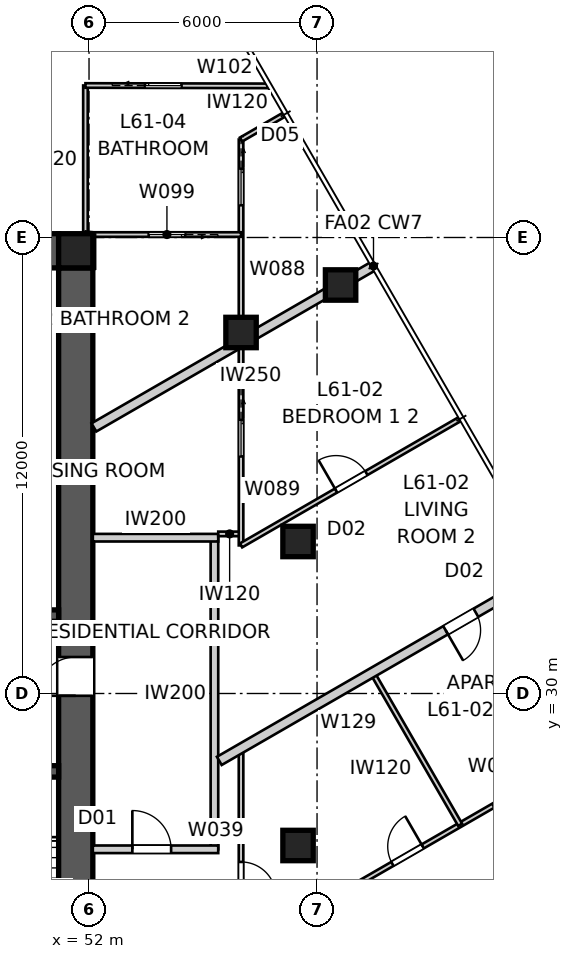
"""IFC4 building model, lengths in metres.
Left out: names, types, materials, properties, quantities, classifications, styles, units other than length and angle.
Written with IfcOpenShell. Run it as: python <this file> out.ifc"""

import sys

from ifc_helpers import new_model, si_unit, direction, frame, frame_2d, origin, origin_2d, place, context, subcontext, project, spatial, polyline, rectangle, outline, extrude, element, fill, save


model = new_model("IFC4")
c1 = context("Model", 3, precision=1e-05, world=origin(), true_north=direction((0.0, 1.0)))
c2 = subcontext(c1, "Body", "Model", "MODEL_VIEW")
j1 = project(units=[si_unit("LENGTHUNIT", "METRE"), si_unit("PLANEANGLEUNIT", "RADIAN")], contexts=[c1])
p1 = place(None, origin())
s1 = spatial("IfcSite", under=j1, at=p1, CompositionType="ELEMENT")
p2 = place(p1, origin())
s2 = spatial("IfcBuilding", under=s1, at=p2, CompositionType="ELEMENT")
p3 = place(p2, frame((0.0, 0.0, 221.8)))
s3 = spatial("IfcBuildingStorey", under=s2, at=p3, CompositionType="ELEMENT", Elevation=221.8)
p4 = place(p3, frame((28.8, 41.65, 0.0), z_axis=(0.0, 0.0, 1.0), x_axis=(1.0, 0.0, 0.0)))
e1 = element("IfcWall", 1, at=p4, inside=s3, PredefinedType="SHEAR", context=c2, shape_type="SweptSolid", body=[
    extrude(outline(polyline([(0.0, -0.45), (22.4, -0.45), (22.4, -0.025), (22.85, -0.025), (22.85, 0.025), (22.4, 0.025), (22.4, 0.45), (0.0, 0.45), (0.0, 0.025), (-0.45, 0.025), (-0.45, -0.025), (0.0, -0.025), (0.0, -0.45)])), origin(), (0.0, 0.0, 1.0), 3.4),
])
p5 = place(p3, frame((51.65, 18.8, 0.0), z_axis=(0.0, 0.0, 1.0), x_axis=(0.0, 1.0, 0.0)))
e2 = element("IfcWall", 2, at=p5, inside=s3, PredefinedType="SHEAR", context=c2, shape_type="SweptSolid", body=[
    extrude(outline(polyline([(0.0, -0.45), (22.4, -0.45), (22.4, -0.025), (22.85, -0.025), (22.85, 0.025), (22.4, 0.025), (22.4, 0.45), (0.0, 0.45), (0.0, 0.025), (-0.45, 0.025), (-0.45, -0.025), (0.0, -0.025), (0.0, -0.45)])), origin(), (0.0, 0.0, 1.0), 3.4),
])
p6 = place(p5, frame((11.14, 0.0, 0.0)))
e3 = element("IfcOpeningElement", 3, at=p6, cuts=e2, PredefinedType="OPENING", context=c2, shape_type="SweptSolid", body=[
    extrude(rectangle(XDim=1.02, YDim=2.4, at=frame_2d((0.51, 1.2))), frame((0.0, 0.46, 0.0), z_axis=(0.0, -1.0, 0.0), x_axis=(1.0, 0.0, 0.0)), (0.0, 0.0, 1.0), 0.92),
])
p7 = place(p3, frame((28.8, 32.05, 0.0), z_axis=(0.0, 0.0, 1.0), x_axis=(1.0, 0.0, 0.0)))
e4 = element("IfcWall", 4, at=p7, inside=s3, PredefinedType="SHEAR", context=c2, shape_type="SweptSolid", body=[
    extrude(rectangle(XDim=22.4, YDim=0.3, at=frame_2d((11.2, 0.0))), origin(), (0.0, 0.0, 1.0), 3.4),
])
p8 = place(p7, frame((19.04, 0.0, 0.0)))
e5 = element("IfcOpeningElement", 5, at=p8, cuts=e4, PredefinedType="OPENING", context=c2, shape_type="SweptSolid", body=[
    extrude(rectangle(XDim=0.92, YDim=2.1, at=frame_2d((0.46, 1.05))), frame((0.0, 0.16, 0.0), z_axis=(0.0, -1.0, 0.0), x_axis=(1.0, 0.0, 0.0)), (0.0, 0.0, 1.0), 0.32),
])
p9 = place(p7, frame((1.265, 0.0, 0.0)))
e6 = element("IfcOpeningElement", 6, at=p9, cuts=e4, PredefinedType="OPENING", context=c2, shape_type="SweptSolid", body=[
    extrude(rectangle(XDim=1.02, YDim=2.1, at=frame_2d((0.51, 1.05))), frame((0.0, 0.16, 0.0), z_axis=(0.0, -1.0, 0.0), x_axis=(1.0, 0.0, 0.0)), (0.0, 0.0, 1.0), 0.32),
])
p10 = place(p7, frame((4.015, 0.0, 0.0)))
e7 = element("IfcOpeningElement", 7, at=p10, cuts=e4, PredefinedType="OPENING", context=c2, shape_type="SweptSolid", body=[
    extrude(rectangle(XDim=0.92, YDim=2.1, at=frame_2d((0.46, 1.05))), frame((0.0, 0.16, 0.0), z_axis=(0.0, -1.0, 0.0), x_axis=(1.0, 0.0, 0.0)), (0.0, 0.0, 1.0), 0.32),
])
p11 = place(p7, frame((6.115, 0.0, 0.0)))
e8 = element("IfcOpeningElement", 8, at=p11, cuts=e4, PredefinedType="OPENING", context=c2, shape_type="SweptSolid", body=[
    extrude(rectangle(XDim=0.92, YDim=2.1, at=frame_2d((0.46, 1.05))), frame((0.0, 0.16, 0.0), z_axis=(0.0, -1.0, 0.0), x_axis=(1.0, 0.0, 0.0)), (0.0, 0.0, 1.0), 0.32),
])
p12 = place(p7, frame((9.79, 0.0, 0.0)))
e9 = element("IfcOpeningElement", 9, at=p12, cuts=e4, PredefinedType="OPENING", context=c2, shape_type="SweptSolid", body=[
    extrude(rectangle(XDim=0.92, YDim=2.1, at=frame_2d((0.46, 1.05))), frame((0.0, 0.16, 0.0), z_axis=(0.0, -1.0, 0.0), x_axis=(1.0, 0.0, 0.0)), (0.0, 0.0, 1.0), 0.32),
])
p13 = place(p7, frame((12.05, 0.0, 0.0)))
e10 = element("IfcOpeningElement", 10, at=p13, cuts=e4, PredefinedType="OPENING", context=c2, shape_type="SweptSolid", body=[
    extrude(rectangle(XDim=1.1, YDim=2.1, at=frame_2d((0.55, 1.05))), frame((0.0, 0.16, 0.0), z_axis=(0.0, -1.0, 0.0), x_axis=(1.0, 0.0, 0.0)), (0.0, 0.0, 1.0), 0.32),
])
p14 = place(p7, frame((14.85, 0.0, 0.0)))
e11 = element("IfcOpeningElement", 11, at=p14, cuts=e4, PredefinedType="OPENING", context=c2, shape_type="SweptSolid", body=[
    extrude(rectangle(XDim=1.1, YDim=2.1, at=frame_2d((0.55, 1.05))), frame((0.0, 0.16, 0.0), z_axis=(0.0, -1.0, 0.0), x_axis=(1.0, 0.0, 0.0)), (0.0, 0.0, 1.0), 0.32),
])
p15 = place(p3, frame((51.2, 27.95, 0.0), z_axis=(0.0, 0.0, 1.0), x_axis=(-1.0, 0.0, 0.0)))
e12 = element("IfcWall", 12, at=p15, inside=s3, PredefinedType="SHEAR", context=c2, shape_type="SweptSolid", body=[
    extrude(rectangle(XDim=22.4, YDim=0.3, at=frame_2d((11.2, 0.0))), origin(), (0.0, 0.0, 1.0), 3.4),
])
p16 = place(p15, frame((19.04, 0.0, 0.0)))
e13 = element("IfcOpeningElement", 13, at=p16, cuts=e12, PredefinedType="OPENING", context=c2, shape_type="SweptSolid", body=[
    extrude(rectangle(XDim=0.92, YDim=2.1, at=frame_2d((0.46, 1.05))), frame((0.0, 0.16, 0.0), z_axis=(0.0, -1.0, 0.0), x_axis=(1.0, 0.0, 0.0)), (0.0, 0.0, 1.0), 0.32),
])
p17 = place(p15, frame((1.265, 0.0, 0.0)))
e14 = element("IfcOpeningElement", 14, at=p17, cuts=e12, PredefinedType="OPENING", context=c2, shape_type="SweptSolid", body=[
    extrude(rectangle(XDim=1.02, YDim=2.1, at=frame_2d((0.51, 1.05))), frame((0.0, 0.16, 0.0), z_axis=(0.0, -1.0, 0.0), x_axis=(1.0, 0.0, 0.0)), (0.0, 0.0, 1.0), 0.32),
])
p18 = place(p15, frame((4.015, 0.0, 0.0)))
e15 = element("IfcOpeningElement", 15, at=p18, cuts=e12, PredefinedType="OPENING", context=c2, shape_type="SweptSolid", body=[
    extrude(rectangle(XDim=0.92, YDim=2.1, at=frame_2d((0.46, 1.05))), frame((0.0, 0.16, 0.0), z_axis=(0.0, -1.0, 0.0), x_axis=(1.0, 0.0, 0.0)), (0.0, 0.0, 1.0), 0.32),
])
p19 = place(p15, frame((9.34, 0.0, 0.0)))
e16 = element("IfcOpeningElement", 16, at=p19, cuts=e12, PredefinedType="OPENING", context=c2, shape_type="SweptSolid", body=[
    extrude(rectangle(XDim=0.92, YDim=2.1, at=frame_2d((0.46, 1.05))), frame((0.0, 0.16, 0.0), z_axis=(0.0, -1.0, 0.0), x_axis=(1.0, 0.0, 0.0)), (0.0, 0.0, 1.0), 0.32),
])
p20 = place(p15, frame((7.015, 0.0, 0.0)))
e17 = element("IfcOpeningElement", 17, at=p20, cuts=e12, PredefinedType="OPENING", context=c2, shape_type="SweptSolid", body=[
    extrude(rectangle(XDim=0.92, YDim=2.1, at=frame_2d((0.46, 1.05))), frame((0.0, 0.16, 0.0), z_axis=(0.0, -1.0, 0.0), x_axis=(1.0, 0.0, 0.0)), (0.0, 0.0, 1.0), 0.32),
])
p21 = place(p15, frame((12.05, 0.0, 0.0)))
e18 = element("IfcOpeningElement", 18, at=p21, cuts=e12, PredefinedType="OPENING", context=c2, shape_type="SweptSolid", body=[
    extrude(rectangle(XDim=1.1, YDim=2.1, at=frame_2d((0.55, 1.05))), frame((0.0, 0.16, 0.0), z_axis=(0.0, -1.0, 0.0), x_axis=(1.0, 0.0, 0.0)), (0.0, 0.0, 1.0), 0.32),
])
p22 = place(p15, frame((14.85, 0.0, 0.0)))
e19 = element("IfcOpeningElement", 19, at=p22, cuts=e12, PredefinedType="OPENING", context=c2, shape_type="SweptSolid", body=[
    extrude(rectangle(XDim=1.1, YDim=2.1, at=frame_2d((0.55, 1.05))), frame((0.0, 0.16, 0.0), z_axis=(0.0, -1.0, 0.0), x_axis=(1.0, 0.0, 0.0)), (0.0, 0.0, 1.0), 0.32),
])
p23 = place(p3, frame((51.65, 41.65, 0.0), z_axis=(0.0, 0.0, 1.0), x_axis=(1.0, 0.0, 0.0)))
e20 = element("IfcColumn", 20, at=p23, inside=s3, PredefinedType="COLUMN", context=c2, shape_type="SweptSolid", body=[
    extrude(rectangle(XDim=0.9, YDim=0.9, at=origin_2d()), origin(), (0.0, 0.0, 1.0), 3.4),
])
for number, where, z_axis, x_axis in (
    (21, (58.62, 40.75, 0.0), (0.0, 0.0, 1.0), (1.0, 0.0, 0.0)),
    (22, (57.5, 26.0, 0.0), (0.0, 0.0, 1.0), (1.0, 0.0, 0.0)),
    (23, (57.5, 34.0, 0.0), (0.0, 0.0, 1.0), (1.0, 0.0, 0.0)),
    (24, (56.0, 39.5, 0.0), (0.0, 0.0, 1.0), (1.0, 0.0, 0.0)),
):
    element("IfcColumn", number, at=place(p3, frame(where, z_axis=z_axis, x_axis=x_axis)), inside=s3, PredefinedType="COLUMN", context=c2, shape_type="SweptSolid", body=[
        extrude(rectangle(XDim=0.8, YDim=0.8, at=origin_2d()), origin(), (0.0, 0.0, 1.0), 3.4),
    ])
p24 = place(p3, frame((55.3, 25.9, 0.0), z_axis=(0.0, 0.0, 1.0), x_axis=(0.0, 1.0, 0.0)))
e25 = element("IfcWall", 25, at=p24, inside=s3, PredefinedType="PARTITIONING", context=c2, shape_type="SweptSolid", body=[
    extrude(rectangle(XDim=8.2, YDim=0.2, at=frame_2d((4.1, 0.0))), origin(), (0.0, 0.0, 1.0), 3.25),
])
p25 = place(p3, frame((52.1, 34.1, 0.0), z_axis=(0.0, 0.0, 1.0), x_axis=(1.0, 0.0, 0.0)))
e26 = element("IfcWall", 26, at=p25, inside=s3, PredefinedType="PARTITIONING", context=c2, shape_type="SweptSolid", body=[
    extrude(rectangle(XDim=3.3, YDim=0.2, at=frame_2d((1.65, 0.0))), origin(), (0.0, 0.0, 1.0), 3.25),
])
p26 = place(p3, frame((52.1, 25.9, 0.0), z_axis=(0.0, 0.0, 1.0), x_axis=(1.0, 0.0, 0.0)))
e27 = element("IfcWall", 27, at=p26, inside=s3, PredefinedType="PARTITIONING", context=c2, shape_type="SweptSolid", body=[
    extrude(rectangle(XDim=3.3, YDim=0.2, at=frame_2d((1.65, 0.0))), origin(), (0.0, 0.0, 1.0), 3.25),
])
p27 = place(p26, frame((1.04, 0.0, 0.0)))
e28 = element("IfcOpeningElement", 28, at=p27, cuts=e27, PredefinedType="OPENING", context=c2, shape_type="SweptSolid", body=[
    extrude(rectangle(XDim=1.02, YDim=2.34, at=frame_2d((0.51, 1.17))), frame((0.0, 0.11, 0.0), z_axis=(0.0, -1.0, 0.0), x_axis=(1.0, 0.0, 0.0)), (0.0, 0.0, 1.0), 0.22),
])
p28 = place(p3, frame((59.486, 41.25, 0.0), z_axis=(0.0, 0.0, 1.0), x_axis=(-0.866020489494, -0.500008511703, 0.0)))
e29 = element("IfcWall", 29, at=p28, inside=s3, PredefinedType="PARTITIONING", context=c2, shape_type="SweptSolid", body=[
    extrude(rectangle(XDim=8.496, YDim=0.25, at=frame_2d((4.248, 0.0))), origin(), (0.0, 0.0, 1.0), 3.25),
])
p29 = place(p3, frame((64.111, 33.239, 0.0), z_axis=(0.0, 0.0, 1.0), x_axis=(-0.866024190901, -0.50000210077, 0.0)))
e30 = element("IfcWall", 30, at=p29, inside=s3, PredefinedType="PARTITIONING", context=c2, shape_type="SweptSolid", body=[
    extrude(rectangle(XDim=10.026, YDim=0.25, at=frame_2d((5.013, 0.0))), origin(), (0.0, 0.0, 1.0), 3.25),
])
p30 = place(p29, frame((2.229, 0.0, 0.0)))
e31 = element("IfcOpeningElement", 31, at=p30, cuts=e30, PredefinedType="OPENING", context=c2, shape_type="SweptSolid", body=[
    extrude(rectangle(XDim=0.92, YDim=2.34, at=frame_2d((0.46, 1.17))), frame((0.0, 0.135, 0.0), z_axis=(0.0, -1.0, 0.0), x_axis=(1.0, 0.0, 0.0)), (0.0, 0.0, 1.0), 0.27),
])
p31 = place(p3, frame((56.0, 28.557, 0.0), z_axis=(0.0, 0.0, 1.0), x_axis=(0.0, -1.0, 0.0)))
e32 = element("IfcWall", 32, at=p31, inside=s3, PredefinedType="PARTITIONING", context=c2, shape_type="SweptSolid", body=[
    extrude(rectangle(XDim=10.601, YDim=0.12, at=frame_2d((5.3, 0.0))), origin(), (0.0, 0.0, 1.0), 2.55),
])
p32 = place(p31, frame((2.989, 0.0, 0.0)))
e33 = element("IfcOpeningElement", 33, at=p32, cuts=e32, PredefinedType="OPENING", context=c2, shape_type="SweptSolid", body=[
    extrude(rectangle(XDim=0.92, YDim=2.34, at=frame_2d((0.46, 1.17))), frame((0.0, 0.07, 0.0), z_axis=(0.0, -1.0, 0.0), x_axis=(1.0, 0.0, 0.0)), (0.0, 0.0, 1.0), 0.14),
])
p33 = place(p3, frame((56.0, 23.216, 0.0), z_axis=(0.0, 0.0, 1.0), x_axis=(0.866023917076, 0.500002575046, 0.0)))
e34 = element("IfcWall", 34, at=p33, inside=s3, PredefinedType="PARTITIONING", context=c2, shape_type="SweptSolid", body=[
    extrude(rectangle(XDim=11.996, YDim=0.12, at=frame_2d((5.998, 0.0))), origin(), (0.0, 0.0, 1.0), 3.25),
])
p34 = place(p33, frame((1.245, 0.0, 0.0)))
e35 = element("IfcOpeningElement", 35, at=p34, cuts=e34, PredefinedType="OPENING", context=c2, shape_type="SweptSolid", body=[
    extrude(rectangle(XDim=0.92, YDim=2.34, at=frame_2d((0.46, 1.17))), frame((0.0, 0.07, 0.0), z_axis=(0.0, -1.0, 0.0), x_axis=(1.0, 0.0, 0.0)), (0.0, 0.0, 1.0), 0.14),
])
p35 = place(p33, frame((4.599, 0.0, 0.0)))
e36 = element("IfcOpeningElement", 36, at=p35, cuts=e34, PredefinedType="OPENING", context=c2, shape_type="SweptSolid", body=[
    extrude(rectangle(XDim=0.92, YDim=2.34, at=frame_2d((0.46, 1.17))), frame((0.0, 0.07, 0.0), z_axis=(0.0, -1.0, 0.0), x_axis=(1.0, 0.0, 0.0)), (0.0, 0.0, 1.0), 0.14),
])
p36 = place(p33, frame((9.394, 0.0, 0.0)))
e37 = element("IfcOpeningElement", 37, at=p36, cuts=e34, PredefinedType="OPENING", context=c2, shape_type="SweptSolid", body=[
    extrude(rectangle(XDim=0.92, YDim=2.34, at=frame_2d((0.46, 1.17))), frame((0.0, 0.07, 0.0), z_axis=(0.0, -1.0, 0.0), x_axis=(1.0, 0.0, 0.0)), (0.0, 0.0, 1.0), 0.14),
])
p37 = place(p3, frame((61.766, 26.545, 0.0), z_axis=(0.0, 0.0, 1.0), x_axis=(-0.499999662836, 0.866025598446, 0.0)))
e38 = element("IfcWall", 38, at=p37, inside=s3, PredefinedType="PARTITIONING", context=c2, shape_type="SweptSolid", body=[
    extrude(rectangle(XDim=4.625, YDim=0.12, at=frame_2d((2.312, 0.0))), origin(), (0.0, 0.0, 1.0), 3.25),
])
p38 = place(p3, frame((56.0, 34.2, 0.0), z_axis=(0.0, 0.0, 1.0), x_axis=(-1.0, 0.0, 0.0)))
e39 = element("IfcWall", 39, at=p38, inside=s3, PredefinedType="PARTITIONING", context=c2, shape_type="SweptSolid", body=[
    extrude(rectangle(XDim=0.6, YDim=0.12, at=frame_2d((0.3, 0.0))), origin(), (0.0, 0.0, 1.0), 3.25),
])
p39 = place(p3, frame((56.0, 44.578, 0.0), z_axis=(0.0, 0.0, 1.0), x_axis=(0.0, -1.0, 0.0)))
e40 = element("IfcWall", 40, at=p39, inside=s3, PredefinedType="PARTITIONING", context=c2, shape_type="SweptSolid", body=[
    extrude(rectangle(XDim=10.681, YDim=0.12, at=frame_2d((5.34, 0.0))), origin(), (0.0, 0.0, 1.0), 2.55),
])
p40 = place(p39, frame((0.77, 0.0, 0.0)))
e41 = element("IfcOpeningElement", 41, at=p40, cuts=e40, PredefinedType="OPENING", context=c2, shape_type="SweptSolid", body=[
    extrude(rectangle(XDim=0.96, YDim=2.1, at=frame_2d((0.48, 1.05))), frame((0.0, 0.07, 0.0), z_axis=(0.0, -1.0, 0.0), x_axis=(1.0, 0.0, 0.0)), (0.0, 0.0, 1.0), 0.14),
])
p41 = place(p39, frame((7.379, 0.0, 0.0)))
e42 = element("IfcOpeningElement", 42, at=p41, cuts=e40, PredefinedType="OPENING", context=c2, shape_type="SweptSolid", body=[
    extrude(rectangle(XDim=0.96, YDim=2.1, at=frame_2d((0.48, 1.05))), frame((0.0, 0.07, 0.0), z_axis=(0.0, -1.0, 0.0), x_axis=(1.0, 0.0, 0.0)), (0.0, 0.0, 1.0), 0.14),
])
p42 = place(p3, frame((56.0, 33.897, 0.0), z_axis=(0.0, 0.0, 1.0), x_axis=(0.866033470286, 0.49998602815, 0.0)))
e43 = element("IfcWall", 43, at=p42, inside=s3, PredefinedType="PARTITIONING", context=c2, shape_type="SweptSolid", body=[
    extrude(rectangle(XDim=6.655, YDim=0.12, at=frame_2d((3.328, 0.0))), origin(), (0.0, 0.0, 1.0), 3.25),
])
p43 = place(p42, frame((2.887, 0.0, 0.0)))
e44 = element("IfcOpeningElement", 44, at=p43, cuts=e43, PredefinedType="OPENING", context=c2, shape_type="SweptSolid", body=[
    extrude(rectangle(XDim=0.92, YDim=2.34, at=frame_2d((0.46, 1.17))), frame((0.0, 0.07, 0.0), z_axis=(0.0, -1.0, 0.0), x_axis=(1.0, 0.0, 0.0)), (0.0, 0.0, 1.0), 0.14),
])
p44 = place(p3, frame((56.0, 42.078, 0.0), z_axis=(0.0, 0.0, 1.0), x_axis=(-1.0, 0.0, 0.0)))
e45 = element("IfcWall", 45, at=p44, inside=s3, PredefinedType="PARTITIONING", context=c2, shape_type="SweptSolid", body=[
    extrude(rectangle(XDim=3.9, YDim=0.12, at=frame_2d((1.95, 0.0))), origin(), (0.0, 0.0, 1.0), 3.25),
])
p45 = place(p44, frame((1.47, 0.0, 0.0)))
e46 = element("IfcOpeningElement", 46, at=p45, cuts=e45, PredefinedType="OPENING", context=c2, shape_type="SweptSolid", body=[
    extrude(rectangle(XDim=0.96, YDim=2.1, at=frame_2d((0.48, 1.05))), frame((0.0, 0.07, 0.0), z_axis=(0.0, -1.0, 0.0), x_axis=(1.0, 0.0, 0.0)), (0.0, 0.0, 1.0), 0.14),
])
p46 = place(p3, frame((51.906, 42.1, 0.0), z_axis=(0.0, 0.0, 1.0), x_axis=(0.0, 1.0, 0.0)))
e47 = element("IfcWall", 47, at=p46, inside=s3, PredefinedType="PARTITIONING", context=c2, shape_type="SweptSolid", body=[
    extrude(rectangle(XDim=3.9, YDim=0.12, at=frame_2d((1.95, 0.0))), origin(), (0.0, 0.0, 1.0), 3.25),
])
p47 = place(p3, frame((51.906, 46.0, 0.0), z_axis=(0.0, 0.0, 1.0), x_axis=(0.999997822794, -0.002086721841, 0.0)))
e48 = element("IfcWall", 48, at=p47, inside=s3, PredefinedType="PARTITIONING", context=c2, shape_type="SweptSolid", body=[
    extrude(rectangle(XDim=4.797, YDim=0.12, at=frame_2d((2.398, 0.0))), origin(), (0.0, 0.0, 1.0), 3.25),
])
p48 = place(p47, frame((1.567, 0.0, 0.0)))
e49 = element("IfcOpeningElement", 49, at=p48, cuts=e48, PredefinedType="OPENING", context=c2, shape_type="SweptSolid", body=[
    extrude(rectangle(XDim=0.96, YDim=2.1, at=frame_2d((0.48, 1.05))), frame((0.0, 0.07, 0.0), z_axis=(0.0, -1.0, 0.0), x_axis=(1.0, 0.0, 0.0)), (0.0, 0.0, 1.0), 0.14),
])
p49 = place(p3, frame((57.138, 45.235, 0.0), z_axis=(0.0, 0.0, 1.0), x_axis=(-0.866040225545, -0.499974327079, 0.0)))
e50 = element("IfcWall", 50, at=p49, inside=s3, PredefinedType="PARTITIONING", context=c2, shape_type="SweptSolid", body=[
    extrude(rectangle(XDim=1.314, YDim=0.12, at=frame_2d((0.657, 0.0))), origin(), (0.0, 0.0, 1.0), 3.25),
])
p50 = place(p3, frame((52.1, 41.18, 0.0), z_axis=(0.0, 0.0, 1.0), x_axis=(0.0, 1.0, 0.0)))
e51 = element("IfcWall", 51, at=p50, inside=s3, PredefinedType="PARTITIONING", context=c2, shape_type="SweptSolid", body=[
    extrude(rectangle(XDim=0.898, YDim=0.12, at=frame_2d((0.449, 0.0))), origin(), (0.0, 0.0, 1.0), 3.25),
])
p51 = place(p3, frame((54.826, 49.241, 0.0), z_axis=(0.0, 0.0, 1.0), x_axis=(-0.866023120914, -0.500003954026, 0.0)))
e52 = element("IfcWall", 52, at=p51, inside=s3, PredefinedType="PARTITIONING", context=c2, shape_type="SweptSolid", body=[
    extrude(rectangle(XDim=6.481, YDim=0.12, at=frame_2d((3.241, 0.0))), origin(), (0.0, 0.0, 1.0), 3.25),
])
p52 = place(p3, frame((51.906, 42.1, 0.0), z_axis=(0.0, 0.0, 1.0), x_axis=(0.993387055489, -0.114813579278, 0.0)))
e53 = element("IfcWall", 53, at=p52, inside=s3, PredefinedType="PARTITIONING", context=c2, shape_type="SweptSolid", body=[
    extrude(rectangle(XDim=0.196, YDim=0.12, at=frame_2d((0.098, 0.0))), origin(), (0.0, 0.0, 1.0), 3.25),
])
p53 = place(p27, origin())
e54 = element("IfcDoor", 54, at=p53, inside=s3, OperationType="SINGLE_SWING_LEFT", PredefinedType="DOOR", context=c2, shape_type="SweptSolid", body=[
    extrude(rectangle(XDim=1.02, YDim=2.34, at=frame_2d((0.51, 1.17))), frame((0.0, 0.025, 0.0), z_axis=(0.0, -1.0, 0.0), x_axis=(1.0, 0.0, 0.0)), (0.0, 0.0, 1.0), 0.05),
])
fill(e28, e54)
p54 = place(p32, origin())
e55 = element("IfcDoor", 55, at=p54, inside=s3, OperationType="SINGLE_SWING_RIGHT", PredefinedType="DOOR", context=c2, shape_type="SweptSolid", body=[
    extrude(rectangle(XDim=0.92, YDim=2.34, at=frame_2d((0.46, 1.17))), frame((0.0, 0.025, 0.0), z_axis=(0.0, -1.0, 0.0), x_axis=(1.0, 0.0, 0.0)), (0.0, 0.0, 1.0), 0.05),
])
fill(e33, e55)
p55 = place(p43, origin())
e56 = element("IfcDoor", 56, at=p55, inside=s3, OperationType="SINGLE_SWING_LEFT", PredefinedType="DOOR", context=c2, shape_type="SweptSolid", body=[
    extrude(rectangle(XDim=0.92, YDim=2.34, at=frame_2d((0.46, 1.17))), frame((0.0, 0.025, 0.0), z_axis=(0.0, -1.0, 0.0), x_axis=(1.0, 0.0, 0.0)), (0.0, 0.0, 1.0), 0.05),
])
fill(e44, e56)
p56 = place(p30, origin())
e57 = element("IfcDoor", 57, at=p56, inside=s3, OperationType="SINGLE_SWING_RIGHT", PredefinedType="DOOR", context=c2, shape_type="SweptSolid", body=[
    extrude(rectangle(XDim=0.92, YDim=2.34, at=frame_2d((0.46, 1.17))), frame((0.0, 0.025, 0.0), z_axis=(0.0, -1.0, 0.0), x_axis=(1.0, 0.0, 0.0)), (0.0, 0.0, 1.0), 0.05),
])
fill(e31, e57)
p57 = place(p35, origin())
e58 = element("IfcDoor", 58, at=p57, inside=s3, OperationType="SINGLE_SWING_RIGHT", PredefinedType="DOOR", context=c2, shape_type="SweptSolid", body=[
    extrude(rectangle(XDim=0.92, YDim=2.34, at=frame_2d((0.46, 1.17))), frame((0.0, 0.025, 0.0), z_axis=(0.0, -1.0, 0.0), x_axis=(1.0, 0.0, 0.0)), (0.0, 0.0, 1.0), 0.05),
])
fill(e36, e58)
p58 = place(p48, origin())
e59 = element("IfcDoor", 59, at=p58, inside=s3, OperationType="SLIDING_TO_LEFT", PredefinedType="DOOR", context=c2, shape_type="SweptSolid", body=[
    extrude(rectangle(XDim=0.96, YDim=2.1, at=frame_2d((0.48, 1.05))), frame((0.0, 0.025, 0.0), z_axis=(0.0, -1.0, 0.0), x_axis=(1.0, 0.0, 0.0)), (0.0, 0.0, 1.0), 0.05),
])
fill(e49, e59)
p59 = place(p45, origin())
e60 = element("IfcDoor", 60, at=p59, inside=s3, OperationType="SLIDING_TO_LEFT", PredefinedType="DOOR", context=c2, shape_type="SweptSolid", body=[
    extrude(rectangle(XDim=0.96, YDim=2.1, at=frame_2d((0.48, 1.05))), frame((0.0, 0.025, 0.0), z_axis=(0.0, -1.0, 0.0), x_axis=(1.0, 0.0, 0.0)), (0.0, 0.0, 1.0), 0.05),
])
fill(e46, e60)
p60 = place(p40, origin())
e61 = element("IfcDoor", 61, at=p60, inside=s3, OperationType="SLIDING_TO_LEFT", PredefinedType="DOOR", context=c2, shape_type="SweptSolid", body=[
    extrude(rectangle(XDim=0.96, YDim=2.1, at=frame_2d((0.48, 1.05))), frame((0.0, 0.025, 0.0), z_axis=(0.0, -1.0, 0.0), x_axis=(1.0, 0.0, 0.0)), (0.0, 0.0, 1.0), 0.05),
])
fill(e41, e61)
p61 = place(p41, origin())
e62 = element("IfcDoor", 62, at=p61, inside=s3, OperationType="SLIDING_TO_LEFT", PredefinedType="DOOR", context=c2, shape_type="SweptSolid", body=[
    extrude(rectangle(XDim=0.96, YDim=2.1, at=frame_2d((0.48, 1.05))), frame((0.0, 0.025, 0.0), z_axis=(0.0, -1.0, 0.0), x_axis=(1.0, 0.0, 0.0)), (0.0, 0.0, 1.0), 0.05),
])
fill(e42, e62)
p62 = place(p6, origin())
e63 = element("IfcDoor", 63, at=p62, inside=s3, OperationType="SINGLE_SWING_LEFT", PredefinedType="DOOR", context=c2, shape_type="SweptSolid", body=[
    extrude(rectangle(XDim=1.02, YDim=2.4, at=frame_2d((0.51, 1.2))), frame((0.0, 0.025, 0.0), z_axis=(0.0, -1.0, 0.0), x_axis=(1.0, 0.0, 0.0)), (0.0, 0.0, 1.0), 0.05),
])
fill(e3, e63)
save(model, sys.argv[1])
